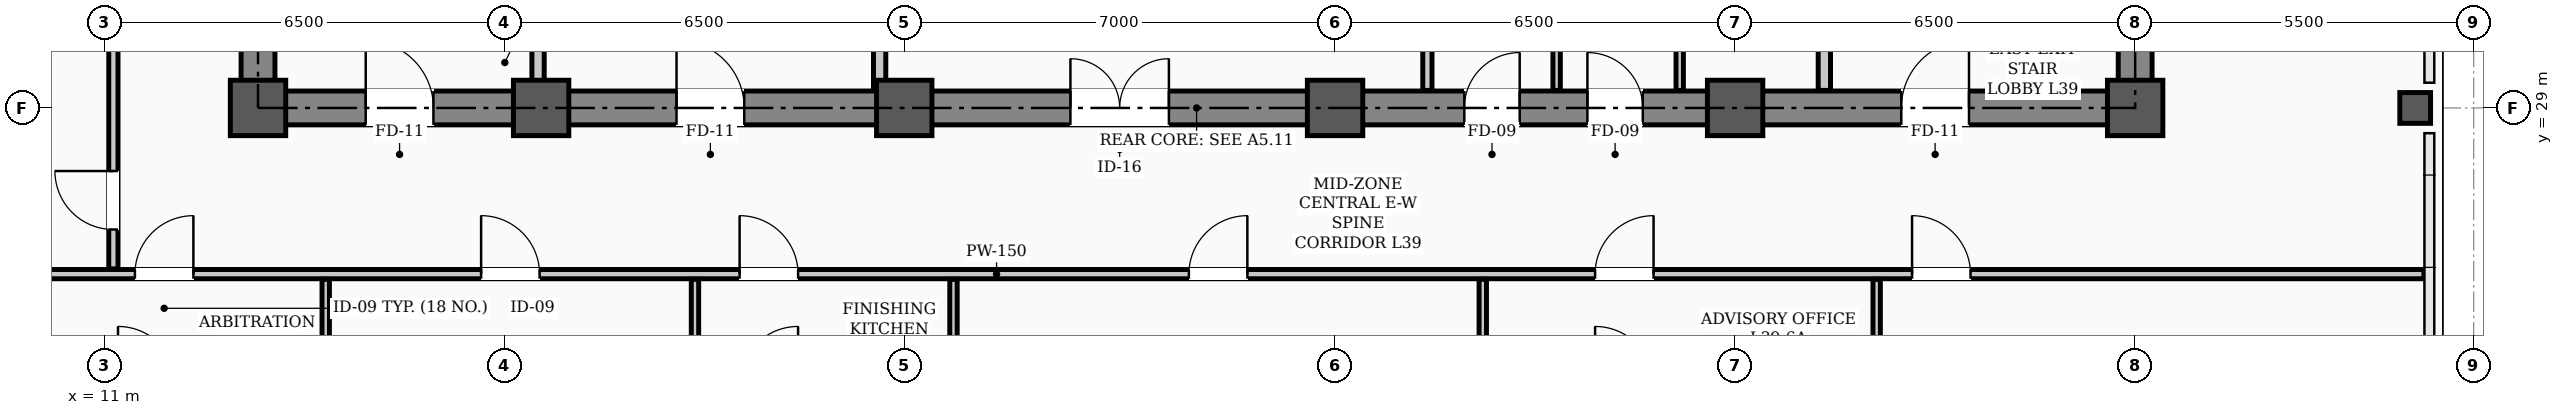
"""IFC4 building model, lengths in metres.
Left out: names, types, materials, properties, quantities, classifications, styles, units other than length and angle.
Written with IfcOpenShell. Run it as: python <this file> out.ifc"""

import sys

from ifc_helpers import new_model, si_unit, direction, frame, frame_2d, origin, origin_2d, place, context, subcontext, project, spatial, rectangle, hollow_rectangle, extrude, element, fill, save


model = new_model("IFC4")
c1 = context("Model", 3, precision=1e-05, world=origin(), true_north=direction((0.0, 1.0)))
c2 = subcontext(c1, "Body", "Model", "MODEL_VIEW")
j1 = project(units=[si_unit("LENGTHUNIT", "METRE"), si_unit("PLANEANGLEUNIT", "RADIAN")], contexts=[c1])
p1 = place(None, origin())
s1 = spatial("IfcSite", under=j1, at=p1, CompositionType="ELEMENT")
p2 = place(p1, origin())
s2 = spatial("IfcBuilding", under=s1, at=p2, CompositionType="ELEMENT")
p3 = place(p2, frame((0.0, 0.0, 157.8)))
s3 = spatial("IfcBuildingStorey", under=s2, at=p3, CompositionType="ELEMENT", Elevation=157.8)
for number, where, z_axis, x_axis in (
    (1, (13.5, 29.0, 0.0), (0.0, 0.0, 1.0), (1.0, 0.0, 0.0)),
    (2, (18.1, 29.0, 0.0), (0.0, 0.0, 1.0), (1.0, 0.0, 0.0)),
    (3, (24.0, 29.0, 0.0), (0.0, 0.0, 1.0), (1.0, 0.0, 0.0)),
    (4, (31.0, 29.0, 0.0), (0.0, 0.0, 1.0), (1.0, 0.0, 0.0)),
    (5, (37.5, 29.0, 0.0), (0.0, 0.0, 1.0), (1.0, 0.0, 0.0)),
    (6, (44.0, 29.0, 0.0), (0.0, 0.0, 1.0), (1.0, 0.0, 0.0)),
):
    element("IfcColumn", number, at=place(p3, frame(where, z_axis=z_axis, x_axis=x_axis)), inside=s3, PredefinedType="COLUMN", context=c2, shape_type="SweptSolid", body=[
        extrude(hollow_rectangle(XDim=0.9, YDim=0.9, WallThickness=0.035, InnerFilletRadius=0.017, OuterFilletRadius=0.052, at=origin_2d()), origin(), (0.0, 0.0, 1.0), 3.9),
    ])
p4 = place(p3, frame((48.55, 29.0, 0.0), z_axis=(0.0, 0.0, 1.0), x_axis=(1.0, 0.0, 0.0)))
e7 = element("IfcColumn", 7, at=p4, inside=s3, PredefinedType="COLUMN", context=c2, shape_type="SweptSolid", body=[
    extrude(hollow_rectangle(XDim=0.5, YDim=0.5, WallThickness=0.024, InnerFilletRadius=0.012, OuterFilletRadius=0.036, at=origin_2d()), origin(), (0.0, 0.0, 1.0), 3.9),
])
p5 = place(p3, frame((13.5, 29.0, 0.0), z_axis=(0.0, 0.0, 1.0), x_axis=(1.0, 0.0, 0.0)))
e8 = element("IfcWall", 8, at=p5, inside=s3, PredefinedType="SHEAR", context=c2, shape_type="SweptSolid", body=[
    extrude(rectangle(XDim=30.5, YDim=0.55, at=frame_2d((15.25, 0.0))), origin(), (0.0, 0.0, 1.0), 3.72),
])
p6 = place(p5, frame((1.75, 0.0, 0.0)))
e9 = element("IfcOpeningElement", 9, at=p6, cuts=e8, PredefinedType="OPENING", context=c2, shape_type="SweptSolid", body=[
    extrude(rectangle(XDim=1.1, YDim=2.08, at=frame_2d((0.55, 1.04))), frame((0.0, 0.285, 0.0), z_axis=(0.0, -1.0, 0.0), x_axis=(1.0, 0.0, 0.0)), (0.0, 0.0, 1.0), 0.57),
])
p7 = place(p5, frame((26.7, 0.0, 0.0)))
e10 = element("IfcOpeningElement", 10, at=p7, cuts=e8, PredefinedType="OPENING", context=c2, shape_type="SweptSolid", body=[
    extrude(rectangle(XDim=1.1, YDim=2.08, at=frame_2d((0.55, 1.04))), frame((0.0, 0.285, 0.0), z_axis=(0.0, -1.0, 0.0), x_axis=(1.0, 0.0, 0.0)), (0.0, 0.0, 1.0), 0.57),
])
p8 = place(p5, frame((6.8, 0.0, 0.0)))
e11 = element("IfcOpeningElement", 11, at=p8, cuts=e8, PredefinedType="OPENING", context=c2, shape_type="SweptSolid", body=[
    extrude(rectangle(XDim=1.1, YDim=2.08, at=frame_2d((0.55, 1.04))), frame((0.0, 0.285, 0.0), z_axis=(0.0, -1.0, 0.0), x_axis=(1.0, 0.0, 0.0)), (0.0, 0.0, 1.0), 0.57),
])
p9 = place(p5, frame((13.2, 0.0, 0.0)))
e12 = element("IfcOpeningElement", 12, at=p9, cuts=e8, PredefinedType="OPENING", context=c2, shape_type="SweptSolid", body=[
    extrude(rectangle(XDim=1.6, YDim=2.08, at=frame_2d((0.8, 1.04))), frame((0.0, 0.285, 0.0), z_axis=(0.0, -1.0, 0.0), x_axis=(1.0, 0.0, 0.0)), (0.0, 0.0, 1.0), 0.57),
])
p10 = place(p5, frame((19.6, 0.0, 0.0)))
e13 = element("IfcOpeningElement", 13, at=p10, cuts=e8, PredefinedType="OPENING", context=c2, shape_type="SweptSolid", body=[
    extrude(rectangle(XDim=0.9, YDim=2.08, at=frame_2d((0.45, 1.04))), frame((0.0, 0.285, 0.0), z_axis=(0.0, -1.0, 0.0), x_axis=(1.0, 0.0, 0.0)), (0.0, 0.0, 1.0), 0.57),
])
p11 = place(p5, frame((21.6, 0.0, 0.0)))
e14 = element("IfcOpeningElement", 14, at=p11, cuts=e8, PredefinedType="OPENING", context=c2, shape_type="SweptSolid", body=[
    extrude(rectangle(XDim=0.9, YDim=2.08, at=frame_2d((0.45, 1.04))), frame((0.0, 0.285, 0.0), z_axis=(0.0, -1.0, 0.0), x_axis=(1.0, 0.0, 0.0)), (0.0, 0.0, 1.0), 0.57),
])
for number, where, z_axis, x_axis in (
    (15, (13.5, 29.35, 0.0), (0.0, 0.0, 1.0), (0.0, 1.0, 0.0)),
    (16, (44.0, 29.35, 0.0), (0.0, 0.0, 1.0), (0.0, 1.0, 0.0)),
):
    element("IfcWall", number, at=place(p3, frame(where, z_axis=z_axis, x_axis=x_axis)), inside=s3, PredefinedType="SHEAR", context=c2, shape_type="SweptSolid", body=[
        extrude(rectangle(XDim=8.6, YDim=0.55, at=frame_2d((4.3, 0.0))), origin(), (0.0, 0.0, 1.0), 3.72),
    ])
p12 = place(p3, frame((2.31, 26.3, 0.0), z_axis=(0.0, 0.0, 1.0), x_axis=(1.0, 0.0, 0.0)))
e17 = element("IfcWall", 17, at=p12, inside=s3, PredefinedType="PARTITIONING", context=c2, shape_type="SweptSolid", body=[
    extrude(rectangle(XDim=46.38, YDim=0.15, at=frame_2d((23.19, 0.0))), origin(), (0.0, 0.0, 1.0), 3.2),
])
p13 = place(p12, frame((9.19, 0.0, 0.0)))
e18 = element("IfcOpeningElement", 18, at=p13, cuts=e17, PredefinedType="OPENING", context=c2, shape_type="SweptSolid", body=[
    extrude(rectangle(XDim=0.95, YDim=2.08, at=frame_2d((0.475, 1.04))), frame((0.0, 0.085, 0.0), z_axis=(0.0, -1.0, 0.0), x_axis=(1.0, 0.0, 0.0)), (0.0, 0.0, 1.0), 0.17),
])
p14 = place(p12, frame((14.815, 0.0, 0.0)))
e19 = element("IfcOpeningElement", 19, at=p14, cuts=e17, PredefinedType="OPENING", context=c2, shape_type="SweptSolid", body=[
    extrude(rectangle(XDim=0.95, YDim=2.08, at=frame_2d((0.475, 1.04))), frame((0.0, 0.085, 0.0), z_axis=(0.0, -1.0, 0.0), x_axis=(1.0, 0.0, 0.0)), (0.0, 0.0, 1.0), 0.17),
])
p15 = place(p12, frame((19.015, 0.0, 0.0)))
e20 = element("IfcOpeningElement", 20, at=p15, cuts=e17, PredefinedType="OPENING", context=c2, shape_type="SweptSolid", body=[
    extrude(rectangle(XDim=0.95, YDim=2.08, at=frame_2d((0.475, 1.04))), frame((0.0, 0.085, 0.0), z_axis=(0.0, -1.0, 0.0), x_axis=(1.0, 0.0, 0.0)), (0.0, 0.0, 1.0), 0.17),
])
p16 = place(p12, frame((26.315, 0.0, 0.0)))
e21 = element("IfcOpeningElement", 21, at=p16, cuts=e17, PredefinedType="OPENING", context=c2, shape_type="SweptSolid", body=[
    extrude(rectangle(XDim=0.95, YDim=2.08, at=frame_2d((0.475, 1.04))), frame((0.0, 0.085, 0.0), z_axis=(0.0, -1.0, 0.0), x_axis=(1.0, 0.0, 0.0)), (0.0, 0.0, 1.0), 0.17),
])
p17 = place(p12, frame((32.915, 0.0, 0.0)))
e22 = element("IfcOpeningElement", 22, at=p17, cuts=e17, PredefinedType="OPENING", context=c2, shape_type="SweptSolid", body=[
    extrude(rectangle(XDim=0.95, YDim=2.08, at=frame_2d((0.475, 1.04))), frame((0.0, 0.085, 0.0), z_axis=(0.0, -1.0, 0.0), x_axis=(1.0, 0.0, 0.0)), (0.0, 0.0, 1.0), 0.17),
])
p18 = place(p12, frame((38.065, 0.0, 0.0)))
e23 = element("IfcOpeningElement", 23, at=p18, cuts=e17, PredefinedType="OPENING", context=c2, shape_type="SweptSolid", body=[
    extrude(rectangle(XDim=0.95, YDim=2.08, at=frame_2d((0.475, 1.04))), frame((0.0, 0.085, 0.0), z_axis=(0.0, -1.0, 0.0), x_axis=(1.0, 0.0, 0.0)), (0.0, 0.0, 1.0), 0.17),
])
for number, where, z_axis, x_axis in (
    (24, (18.05, 29.285, 0.0), (0.0, 0.0, 1.0), (0.0, 1.0, 0.0)),
    (25, (38.95, 29.285, 0.0), (0.0, 0.0, 1.0), (0.0, 1.0, 0.0)),
):
    element("IfcWall", number, at=place(p3, frame(where, z_axis=z_axis, x_axis=x_axis)), inside=s3, PredefinedType="STANDARD", context=c2, shape_type="SweptSolid", body=[
        extrude(rectangle(XDim=1.015, YDim=0.2, at=frame_2d((0.508, 0.0))), origin(), (0.0, 0.0, 1.0), 3.35),
    ])
p19 = place(p3, frame((23.6, 29.285, 0.0), z_axis=(0.0, 0.0, 1.0), x_axis=(0.0, 1.0, 0.0)))
e26 = element("IfcWall", 26, at=p19, inside=s3, PredefinedType="STANDARD", context=c2, shape_type="SweptSolid", body=[
    extrude(rectangle(XDim=5.415, YDim=0.2, at=frame_2d((2.708, 0.0))), origin(), (0.0, 0.0, 1.0), 3.2),
])
p20 = place(p3, frame((32.5, 29.285, 0.0), z_axis=(0.0, 0.0, 1.0), x_axis=(0.0, 1.0, 0.0)))
e27 = element("IfcWall", 27, at=p20, inside=s3, PredefinedType="PARTITIONING", context=c2, shape_type="SweptSolid", body=[
    extrude(rectangle(XDim=2.48, YDim=0.15, at=frame_2d((1.24, 0.0))), origin(), (0.0, 0.0, 1.0), 3.35),
])
for number, where, z_axis, x_axis in (
    (28, (36.6, 29.285, 0.0), (0.0, 0.0, 1.0), (0.0, 1.0, 0.0)),
    (29, (34.6, 29.285, 0.0), (0.0, 0.0, 1.0), (0.0, 1.0, 0.0)),
):
    element("IfcWall", number, at=place(p3, frame(where, z_axis=z_axis, x_axis=x_axis)), inside=s3, PredefinedType="PARTITIONING", context=c2, shape_type="SweptSolid", body=[
        extrude(rectangle(XDim=2.48, YDim=0.12, at=frame_2d((1.24, 0.0))), origin(), (0.0, 0.0, 1.0), 3.35),
    ])
p21 = place(p3, frame((11.15, 26.385, 0.0), z_axis=(0.0, 0.0, 1.0), x_axis=(0.0, 1.0, 0.0)))
e30 = element("IfcWall", 30, at=p21, inside=s3, PredefinedType="PARTITIONING", context=c2, shape_type="SweptSolid", body=[
    extrude(rectangle(XDim=13.58, YDim=0.15, at=frame_2d((6.79, 0.0))), origin(), (0.0, 0.0, 1.0), 3.1),
])
p22 = place(p21, frame((0.64, 0.0, 0.0)))
e31 = element("IfcOpeningElement", 31, at=p22, cuts=e30, PredefinedType="OPENING", context=c2, shape_type="SweptSolid", body=[
    extrude(rectangle(XDim=0.95, YDim=2.08, at=frame_2d((0.475, 1.04))), frame((0.0, 0.085, 0.0), z_axis=(0.0, -1.0, 0.0), x_axis=(1.0, 0.0, 0.0)), (0.0, 0.0, 1.0), 0.17),
])
p23 = place(p21, frame((9.465, 0.0, 0.0)))
e32 = element("IfcOpeningElement", 32, at=p23, cuts=e30, PredefinedType="OPENING", context=c2, shape_type="SweptSolid", body=[
    extrude(rectangle(XDim=0.95, YDim=2.08, at=frame_2d((0.475, 1.04))), frame((0.0, 0.085, 0.0), z_axis=(0.0, -1.0, 0.0), x_axis=(1.0, 0.0, 0.0)), (0.0, 0.0, 1.0), 0.17),
])
for number, where, z_axis, x_axis in (
    (33, (14.6, 16.31, 0.0), (0.0, 0.0, 1.0), (0.0, 1.0, 0.0)),
    (34, (20.6, 16.31, 0.0), (0.0, 0.0, 1.0), (0.0, 1.0, 0.0)),
):
    element("IfcWall", number, at=place(p3, frame(where, z_axis=z_axis, x_axis=x_axis)), inside=s3, PredefinedType="PARTITIONING", context=c2, shape_type="SweptSolid", body=[
        extrude(rectangle(XDim=9.905, YDim=0.12, at=frame_2d((4.953, 0.0))), origin(), (0.0, 0.0, 1.0), 3.1),
    ])
p24 = place(p3, frame((24.8, 18.07, 0.0), z_axis=(0.0, 0.0, 1.0), x_axis=(0.0, 1.0, 0.0)))
e35 = element("IfcWall", 35, at=p24, inside=s3, PredefinedType="PARTITIONING", context=c2, shape_type="SweptSolid", body=[
    extrude(rectangle(XDim=8.145, YDim=0.12, at=frame_2d((4.073, 0.0))), origin(), (0.0, 0.0, 1.0), 3.1),
])
for number, where, z_axis, x_axis in (
    (36, (33.4, 16.31, 0.0), (0.0, 0.0, 1.0), (0.0, 1.0, 0.0)),
    (37, (39.8, 16.31, 0.0), (0.0, 0.0, 1.0), (0.0, 1.0, 0.0)),
):
    element("IfcWall", number, at=place(p3, frame(where, z_axis=z_axis, x_axis=x_axis)), inside=s3, PredefinedType="PARTITIONING", context=c2, shape_type="SweptSolid", body=[
        extrude(rectangle(XDim=9.905, YDim=0.12, at=frame_2d((4.953, 0.0))), origin(), (0.0, 0.0, 1.0), 3.1),
    ])
p25 = place(p6, origin())
e38 = element("IfcDoor", 38, at=p25, inside=s3, OperationType="SINGLE_SWING_LEFT", PredefinedType="DOOR", context=c2, shape_type="SweptSolid", body=[
    extrude(rectangle(XDim=1.1, YDim=2.08, at=frame_2d((0.55, 1.04))), frame((0.0, 0.025, 0.0), z_axis=(0.0, -1.0, 0.0), x_axis=(1.0, 0.0, 0.0)), (0.0, 0.0, 1.0), 0.05),
])
fill(e9, e38)
p26 = place(p7, origin())
e39 = element("IfcDoor", 39, at=p26, inside=s3, OperationType="SINGLE_SWING_RIGHT", PredefinedType="DOOR", context=c2, shape_type="SweptSolid", body=[
    extrude(rectangle(XDim=1.1, YDim=2.08, at=frame_2d((0.55, 1.04))), frame((0.0, 0.025, 0.0), z_axis=(0.0, -1.0, 0.0), x_axis=(1.0, 0.0, 0.0)), (0.0, 0.0, 1.0), 0.05),
])
fill(e10, e39)
p27 = place(p8, origin())
e40 = element("IfcDoor", 40, at=p27, inside=s3, OperationType="SINGLE_SWING_LEFT", PredefinedType="DOOR", context=c2, shape_type="SweptSolid", body=[
    extrude(rectangle(XDim=1.1, YDim=2.08, at=frame_2d((0.55, 1.04))), frame((0.0, 0.025, 0.0), z_axis=(0.0, -1.0, 0.0), x_axis=(1.0, 0.0, 0.0)), (0.0, 0.0, 1.0), 0.05),
])
fill(e11, e40)
p28 = place(p9, origin())
e41 = element("IfcDoor", 41, at=p28, inside=s3, OperationType="DOUBLE_DOOR_SINGLE_SWING", PredefinedType="DOOR", context=c2, shape_type="SweptSolid", body=[
    extrude(rectangle(XDim=1.6, YDim=2.08, at=frame_2d((0.8, 1.04))), frame((0.0, 0.025, 0.0), z_axis=(0.0, -1.0, 0.0), x_axis=(1.0, 0.0, 0.0)), (0.0, 0.0, 1.0), 0.05),
])
fill(e12, e41)
p29 = place(p10, origin())
e42 = element("IfcDoor", 42, at=p29, inside=s3, OperationType="SINGLE_SWING_RIGHT", PredefinedType="DOOR", context=c2, shape_type="SweptSolid", body=[
    extrude(rectangle(XDim=0.9, YDim=2.08, at=frame_2d((0.45, 1.04))), frame((0.0, 0.025, 0.0), z_axis=(0.0, -1.0, 0.0), x_axis=(1.0, 0.0, 0.0)), (0.0, 0.0, 1.0), 0.05),
])
fill(e13, e42)
p30 = place(p11, origin())
e43 = element("IfcDoor", 43, at=p30, inside=s3, OperationType="SINGLE_SWING_LEFT", PredefinedType="DOOR", context=c2, shape_type="SweptSolid", body=[
    extrude(rectangle(XDim=0.9, YDim=2.08, at=frame_2d((0.45, 1.04))), frame((0.0, 0.025, 0.0), z_axis=(0.0, -1.0, 0.0), x_axis=(1.0, 0.0, 0.0)), (0.0, 0.0, 1.0), 0.05),
])
fill(e14, e43)
p31 = place(p13, origin())
e44 = element("IfcDoor", 44, at=p31, inside=s3, OperationType="SINGLE_SWING_RIGHT", PredefinedType="DOOR", context=c2, shape_type="SweptSolid", body=[
    extrude(rectangle(XDim=0.95, YDim=2.08, at=frame_2d((0.475, 1.04))), frame((0.0, 0.025, 0.0), z_axis=(0.0, -1.0, 0.0), x_axis=(1.0, 0.0, 0.0)), (0.0, 0.0, 1.0), 0.05),
])
fill(e18, e44)
p32 = place(p14, origin())
e45 = element("IfcDoor", 45, at=p32, inside=s3, OperationType="SINGLE_SWING_LEFT", PredefinedType="DOOR", context=c2, shape_type="SweptSolid", body=[
    extrude(rectangle(XDim=0.95, YDim=2.08, at=frame_2d((0.475, 1.04))), frame((0.0, 0.025, 0.0), z_axis=(0.0, -1.0, 0.0), x_axis=(1.0, 0.0, 0.0)), (0.0, 0.0, 1.0), 0.05),
])
fill(e19, e45)
p33 = place(p15, origin())
e46 = element("IfcDoor", 46, at=p33, inside=s3, OperationType="SINGLE_SWING_LEFT", PredefinedType="DOOR", context=c2, shape_type="SweptSolid", body=[
    extrude(rectangle(XDim=0.95, YDim=2.08, at=frame_2d((0.475, 1.04))), frame((0.0, 0.025, 0.0), z_axis=(0.0, -1.0, 0.0), x_axis=(1.0, 0.0, 0.0)), (0.0, 0.0, 1.0), 0.05),
])
fill(e20, e46)
p34 = place(p16, origin())
e47 = element("IfcDoor", 47, at=p34, inside=s3, OperationType="SINGLE_SWING_RIGHT", PredefinedType="DOOR", context=c2, shape_type="SweptSolid", body=[
    extrude(rectangle(XDim=0.95, YDim=2.08, at=frame_2d((0.475, 1.04))), frame((0.0, 0.025, 0.0), z_axis=(0.0, -1.0, 0.0), x_axis=(1.0, 0.0, 0.0)), (0.0, 0.0, 1.0), 0.05),
])
fill(e21, e47)
p35 = place(p17, origin())
e48 = element("IfcDoor", 48, at=p35, inside=s3, OperationType="SINGLE_SWING_RIGHT", PredefinedType="DOOR", context=c2, shape_type="SweptSolid", body=[
    extrude(rectangle(XDim=0.95, YDim=2.08, at=frame_2d((0.475, 1.04))), frame((0.0, 0.025, 0.0), z_axis=(0.0, -1.0, 0.0), x_axis=(1.0, 0.0, 0.0)), (0.0, 0.0, 1.0), 0.05),
])
fill(e22, e48)
p36 = place(p18, origin())
e49 = element("IfcDoor", 49, at=p36, inside=s3, OperationType="SINGLE_SWING_LEFT", PredefinedType="DOOR", context=c2, shape_type="SweptSolid", body=[
    extrude(rectangle(XDim=0.95, YDim=2.08, at=frame_2d((0.475, 1.04))), frame((0.0, 0.025, 0.0), z_axis=(0.0, -1.0, 0.0), x_axis=(1.0, 0.0, 0.0)), (0.0, 0.0, 1.0), 0.05),
])
fill(e23, e49)
p37 = place(p22, origin())
e50 = element("IfcDoor", 50, at=p37, inside=s3, OperationType="SINGLE_SWING_RIGHT", PredefinedType="DOOR", context=c2, shape_type="SweptSolid", body=[
    extrude(rectangle(XDim=0.95, YDim=2.08, at=frame_2d((0.475, 1.04))), frame((0.0, 0.025, 0.0), z_axis=(0.0, -1.0, 0.0), x_axis=(1.0, 0.0, 0.0)), (0.0, 0.0, 1.0), 0.05),
])
fill(e31, e50)
save(model, sys.argv[1])
